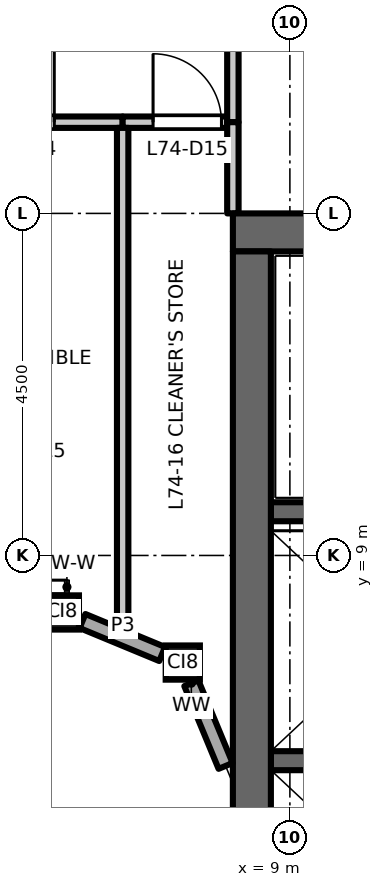
"""IFC4 building model, lengths in metres.
Left out: names, types, materials, properties, quantities, classifications, styles, units other than length and angle.
Written with IfcOpenShell. Run it as: python <this file> out.ifc"""

import sys

from ifc_helpers import new_model, si_unit, direction, frame, frame_2d, origin, origin_2d, place, context, subcontext, project, spatial, rectangle, hollow_rectangle, extrude, element, fill, save


model = new_model("IFC4")
c1 = context("Model", 3, precision=1e-05, world=origin(), true_north=direction((0.0, 1.0)))
c2 = subcontext(c1, "Body", "Model", "MODEL_VIEW")
j1 = project(units=[si_unit("LENGTHUNIT", "METRE"), si_unit("PLANEANGLEUNIT", "RADIAN")], contexts=[c1])
p1 = place(None, origin())
s1 = spatial("IfcSite", under=j1, at=p1, CompositionType="ELEMENT")
p2 = place(p1, origin())
s2 = spatial("IfcBuilding", under=s1, at=p2, CompositionType="ELEMENT")
p3 = place(p2, frame((0.0, 0.0, 343.7)))
s3 = spatial("IfcBuildingStorey", under=s2, at=p3, CompositionType="ELEMENT", Elevation=343.7)
for number, where, z_axis, x_axis in (
    (1, (6.0, 8.25, 0.0), (0.0, 0.0, 1.0), (1.0, 0.0, 0.0)),
    (2, (7.591, 7.591, 0.0), (0.0, 0.0, 1.0), (1.0, 0.0, 0.0)),
):
    element("IfcColumn", number, at=place(p3, frame(where, z_axis=z_axis, x_axis=x_axis)), inside=s3, PredefinedType="COLUMN", context=c2, shape_type="SweptSolid", body=[
        extrude(hollow_rectangle(XDim=0.45, YDim=0.45, WallThickness=0.022, at=origin_2d()), origin(), (0.0, 0.0, 1.0), 4.5),
    ])
p4 = place(p3, frame((8.75, 6.3, 0.0), z_axis=(0.0, 0.0, 1.0), x_axis=(1.0, 0.0, 0.0)))
e3 = element("IfcWall", 3, at=p4, inside=s3, PredefinedType="SHEAR", context=c2, shape_type="SweptSolid", body=[
    extrude(rectangle(XDim=3.1, YDim=0.25, at=frame_2d((1.55, 0.0))), origin(), (0.0, 0.0, 1.0), 4.3),
])
p5 = place(p3, frame((8.75, 9.575, 0.0), z_axis=(0.0, 0.0, 1.0), x_axis=(1.0, 0.0, 0.0)))
e4 = element("IfcWall", 4, at=p5, inside=s3, PredefinedType="SHEAR", context=c2, shape_type="SweptSolid", body=[
    extrude(rectangle(XDim=8.0, YDim=0.25, at=frame_2d((4.0, 0.0))), origin(), (0.0, 0.0, 1.0), 4.3),
])
p6 = place(p5, frame((6.65, 0.0, 0.0)))
e5 = element("IfcOpeningElement", 5, at=p6, cuts=e4, PredefinedType="OPENING", context=c2, shape_type="SweptSolid", body=[
    extrude(rectangle(XDim=1.1, YDim=2.1, at=frame_2d((0.55, 1.05))), frame((0.0, 0.135, 0.0), z_axis=(0.0, -1.0, 0.0), x_axis=(1.0, 0.0, 0.0)), (0.0, 0.0, 1.0), 0.27),
])
p7 = place(p3, frame((8.25, 13.25, 0.0), z_axis=(0.0, 0.0, 1.0), x_axis=(1.0, 0.0, 0.0)))
e6 = element("IfcWall", 6, at=p7, inside=s3, PredefinedType="SHEAR", context=c2, shape_type="SweptSolid", body=[
    extrude(rectangle(XDim=9.0, YDim=0.5, at=frame_2d((4.5, 0.0))), origin(), (0.0, 0.0, 1.0), 4.3),
])
p8 = place(p3, frame((8.5, -13.0, 0.0), z_axis=(0.0, 0.0, 1.0), x_axis=(0.0, 1.0, 0.0)))
e7 = element("IfcWall", 7, at=p8, inside=s3, PredefinedType="SHEAR", context=c2, shape_type="SweptSolid", body=[
    extrude(rectangle(XDim=26.0, YDim=0.5, at=frame_2d((13.0, 0.0))), origin(), (0.0, 0.0, 1.0), 4.3),
])
p9 = place(p3, frame((8.154, 6.231, 0.0), z_axis=(0.0, 0.0, 1.0), x_axis=(-0.382760542083, 0.92384758885, 0.0)))
e8 = element("IfcWall", 8, at=p9, inside=s3, PredefinedType="STANDARD", context=c2, shape_type="SweptSolid", body=[
    extrude(rectangle(XDim=1.178, YDim=0.2, at=frame_2d((0.589, 0.0))), origin(), (0.0, 0.0, 1.0), 3.96),
])
p10 = place(p3, frame((7.319, 7.703, 0.0), z_axis=(0.0, 0.0, 1.0), x_axis=(-0.923864661962, 0.382719331074, 0.0)))
e9 = element("IfcWall", 9, at=p10, inside=s3, PredefinedType="STANDARD", context=c2, shape_type="SweptSolid", body=[
    extrude(rectangle(XDim=1.134, YDim=0.2, at=frame_2d((0.567, 0.0))), origin(), (0.0, 0.0, 1.0), 3.96),
])
p11 = place(p3, frame((-8.175, 14.7, 0.0), z_axis=(0.0, 0.0, 1.0), x_axis=(1.0, 0.0, 0.0)))
e10 = element("IfcWall", 10, at=p11, inside=s3, PredefinedType="PARTITIONING", context=c2, shape_type="SweptSolid", body=[
    extrude(rectangle(XDim=14.975, YDim=0.15, at=frame_2d((7.488, 0.0))), origin(), (0.0, 0.0, 1.0), 4.3),
])
p12 = place(p11, frame((4.575, 0.0, 0.0)))
e11 = element("IfcOpeningElement", 11, at=p12, cuts=e10, PredefinedType="OPENING", context=c2, shape_type="SweptSolid", body=[
    extrude(rectangle(XDim=1.0, YDim=2.1, at=frame_2d((0.5, 1.05))), frame((0.0, 0.085, 0.0), z_axis=(0.0, -1.0, 0.0), x_axis=(1.0, 0.0, 0.0)), (0.0, 0.0, 1.0), 0.17),
])
p13 = place(p11, frame((6.825, 0.0, 0.0)))
e12 = element("IfcOpeningElement", 12, at=p13, cuts=e10, PredefinedType="OPENING", context=c2, shape_type="SweptSolid", body=[
    extrude(rectangle(XDim=1.0, YDim=2.1, at=frame_2d((0.5, 1.05))), frame((0.0, 0.085, 0.0), z_axis=(0.0, -1.0, 0.0), x_axis=(1.0, 0.0, 0.0)), (0.0, 0.0, 1.0), 0.17),
])
p14 = place(p11, frame((13.075, 0.0, 0.0)))
e13 = element("IfcOpeningElement", 13, at=p14, cuts=e10, PredefinedType="OPENING", context=c2, shape_type="SweptSolid", body=[
    extrude(rectangle(XDim=1.0, YDim=2.1, at=frame_2d((0.5, 1.05))), frame((0.0, 0.085, 0.0), z_axis=(0.0, -1.0, 0.0), x_axis=(1.0, 0.0, 0.0)), (0.0, 0.0, 1.0), 0.17),
])
p15 = place(p3, frame((6.8, 14.7, 0.0), z_axis=(0.0, 0.0, 1.0), x_axis=(1.0, 0.0, 0.0)))
e14 = element("IfcWall", 14, at=p15, inside=s3, PredefinedType="PARTITIONING", context=c2, shape_type="SweptSolid", body=[
    extrude(rectangle(XDim=1.375, YDim=0.15, at=frame_2d((0.688, 0.0))), origin(), (0.0, 0.0, 1.0), 4.3),
])
p16 = place(p15, frame((0.4, 0.0, 0.0)))
e15 = element("IfcOpeningElement", 15, at=p16, cuts=e14, PredefinedType="OPENING", context=c2, shape_type="SweptSolid", body=[
    extrude(rectangle(XDim=0.9, YDim=2.1, at=frame_2d((0.45, 1.05))), frame((0.0, 0.085, 0.0), z_axis=(0.0, -1.0, 0.0), x_axis=(1.0, 0.0, 0.0)), (0.0, 0.0, 1.0), 0.17),
])
p17 = place(p3, frame((6.8, 8.069, 0.0), z_axis=(0.0, 0.0, 1.0), x_axis=(0.0, 1.0, 0.0)))
e16 = element("IfcWall", 16, at=p17, inside=s3, PredefinedType="PARTITIONING", context=c2, shape_type="SweptSolid", body=[
    extrude(rectangle(XDim=6.556, YDim=0.15, at=frame_2d((3.278, 0.0))), origin(), (0.0, 0.0, 1.0), 4.3),
])
p18 = place(p3, frame((8.25, 14.7, 0.0), z_axis=(0.0, 0.0, 1.0), x_axis=(0.0, 1.0, 0.0)))
e17 = element("IfcWall", 17, at=p18, inside=s3, PredefinedType="PARTITIONING", context=c2, shape_type="SweptSolid", body=[
    extrude(rectangle(XDim=2.125, YDim=0.15, at=frame_2d((1.062, 0.0))), origin(), (0.0, 0.0, 1.0), 4.3),
])
p19 = place(p3, frame((8.25, 13.5, 0.0), z_axis=(0.0, 0.0, 1.0), x_axis=(0.0, 1.0, 0.0)))
e18 = element("IfcWall", 18, at=p19, inside=s3, PredefinedType="PARTITIONING", context=c2, shape_type="SweptSolid", body=[
    extrude(rectangle(XDim=1.2, YDim=0.15, at=frame_2d((0.6, 0.0))), origin(), (0.0, 0.0, 1.0), 4.3),
])
p20 = place(p14, origin())
e19 = element("IfcDoor", 19, at=p20, inside=s3, OperationType="SINGLE_SWING_RIGHT", PredefinedType="DOOR", context=c2, shape_type="SweptSolid", body=[
    extrude(rectangle(XDim=1.0, YDim=2.1, at=frame_2d((0.5, 1.05))), frame((0.0, 0.025, 0.0), z_axis=(0.0, -1.0, 0.0), x_axis=(1.0, 0.0, 0.0)), (0.0, 0.0, 1.0), 0.05),
])
fill(e13, e19)
p21 = place(p16, origin())
e20 = element("IfcDoor", 20, at=p21, inside=s3, OperationType="SINGLE_SWING_LEFT", PredefinedType="DOOR", context=c2, shape_type="SweptSolid", body=[
    extrude(rectangle(XDim=0.9, YDim=2.1, at=frame_2d((0.45, 1.05))), frame((0.0, 0.025, 0.0), z_axis=(0.0, -1.0, 0.0), x_axis=(1.0, 0.0, 0.0)), (0.0, 0.0, 1.0), 0.05),
])
fill(e15, e20)
save(model, sys.argv[1])
